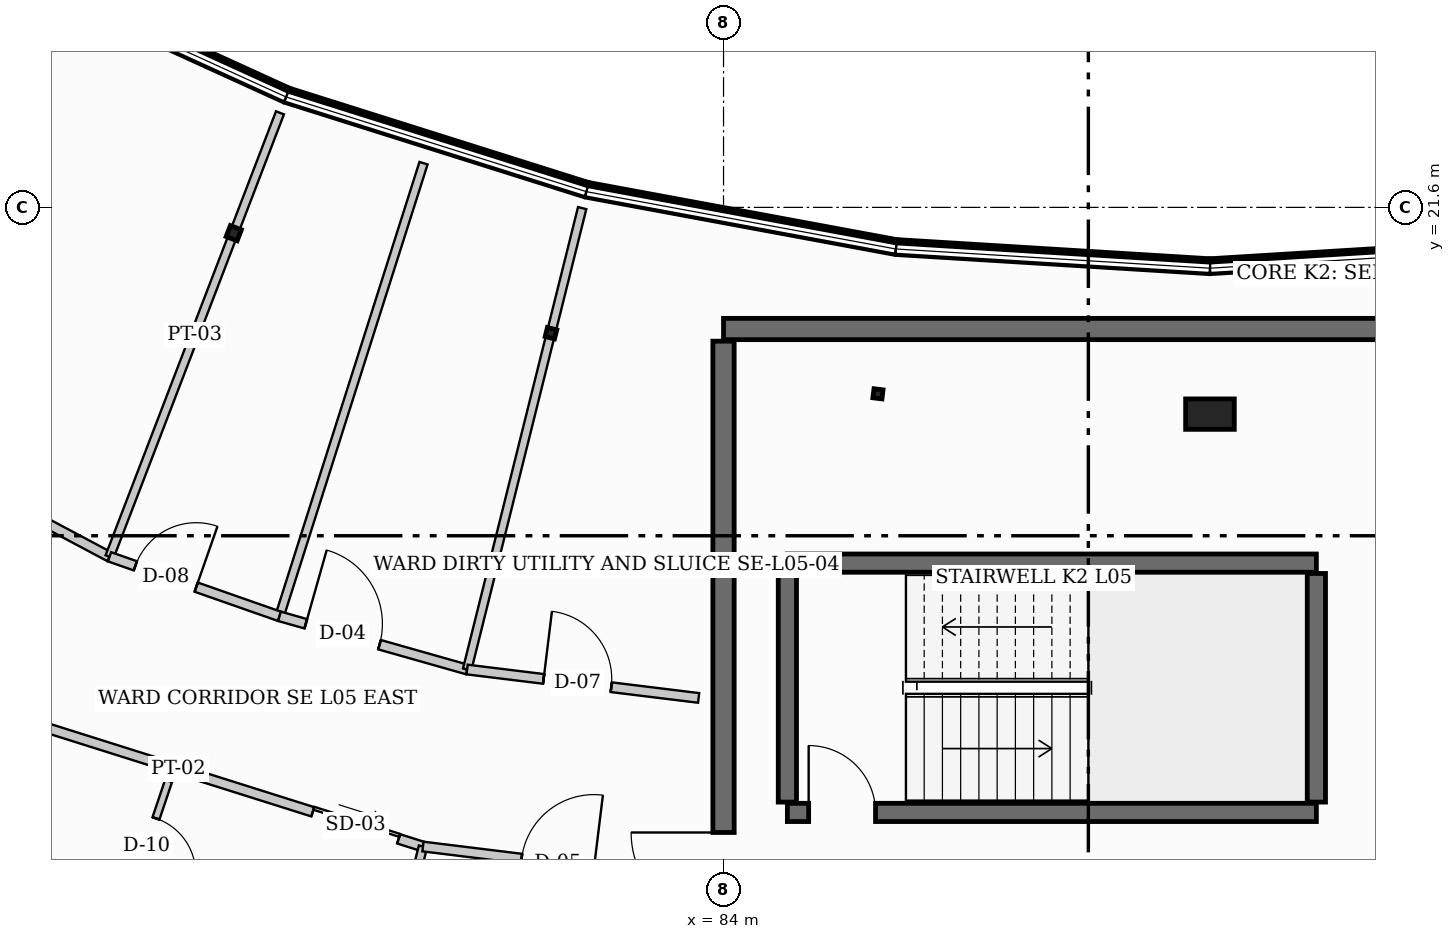
"""IFC4 building model, lengths in metres.
Left out: names, types, materials, properties, quantities, classifications, styles, units other than length and angle.
Written with IfcOpenShell. Run it as: python <this file> out.ifc"""

import sys

from ifc_helpers import new_model, si_unit, direction, frame, frame_2d, origin, origin_2d, place, context, subcontext, project, spatial, rectangle, hollow_rectangle, hollow_circle, i_section, extrude, element, fill, save


model = new_model("IFC4")
c1 = context("Model", 3, precision=1e-05, world=origin(), true_north=direction((0.0, 1.0)))
c2 = subcontext(c1, "Body", "Model", "MODEL_VIEW")
j1 = project(units=[si_unit("LENGTHUNIT", "METRE"), si_unit("PLANEANGLEUNIT", "RADIAN")], contexts=[c1])
p1 = place(None, origin())
s1 = spatial("IfcSite", under=j1, at=p1, CompositionType="ELEMENT")
p2 = place(p1, origin())
s2 = spatial("IfcBuilding", under=s1, at=p2, CompositionType="ELEMENT")
p3 = place(p2, frame((0.0, 0.0, 22.2)))
s3 = spatial("IfcBuildingStorey", under=s2, at=p3, CompositionType="ELEMENT", Elevation=22.2)
p4 = place(p3, frame((75.945, 21.176, 0.0), z_axis=(0.0, 0.0, 1.0), x_axis=(0.358367949545, 0.933580426497, 0.0)))
e1 = element("IfcColumn", 1, at=p4, inside=s3, PredefinedType="COLUMN", context=c2, shape_type="SweptSolid", body=[
    extrude(hollow_circle(Radius=0.097, WallThickness=0.008, at=origin_2d()), origin(), (0.0, 0.0, 1.0), 3.9),
])
p5 = place(p3, frame((81.162, 19.531, 0.0), z_axis=(0.0, 0.0, 1.0), x_axis=(0.2419218956, 0.970295726276, 0.0)))
e2 = element("IfcColumn", 2, at=p5, inside=s3, PredefinedType="COLUMN", context=c2, shape_type="SweptSolid", body=[
    extrude(i_section(OverallWidth=0.153, OverallDepth=0.158, WebThickness=0.007, FlangeThickness=0.01, at=origin_2d()), origin(), (0.0, 0.0, 1.0), 3.9),
])
p6 = place(p3, frame((86.54, 18.534, 0.0), z_axis=(0.0, 0.0, 1.0), x_axis=(0.121869343405, 0.992546151641, 0.0)))
e3 = element("IfcColumn", 3, at=p6, inside=s3, PredefinedType="COLUMN", context=c2, shape_type="SweptSolid", body=[
    extrude(hollow_rectangle(XDim=0.15, YDim=0.15, WallThickness=0.008, at=origin_2d()), origin(), (0.0, 0.0, 1.0), 3.9),
])
p7 = place(p3, frame((92.0, 18.2, 0.0), z_axis=(0.0, 0.0, 1.0), x_axis=(0.0, 1.0, 0.0)))
e4 = element("IfcColumn", 4, at=p7, inside=s3, PredefinedType="PILASTER", context=c2, shape_type="SweptSolid", body=[
    extrude(rectangle(XDim=0.5, YDim=0.8, at=origin_2d()), origin(), (0.0, 0.0, 1.0), 3.9),
])
p8 = place(p3, frame((84.0, 19.6, 0.0), z_axis=(0.0, 0.0, 1.0), x_axis=(1.0, 0.0, 0.0)))
e5 = element("IfcWall", 5, at=p8, inside=s3, PredefinedType="SHEAR", context=c2, shape_type="SweptSolid", body=[
    extrude(rectangle(XDim=20.4, YDim=0.35, at=frame_2d((10.2, 0.0))), origin(), (0.0, 0.0, 1.0), 3.9),
])
p9 = place(p3, frame((84.0, 8.8, 0.0), z_axis=(0.0, 0.0, 1.0), x_axis=(0.0, 1.0, 0.0)))
e6 = element("IfcWall", 6, at=p9, inside=s3, PredefinedType="SHEAR", context=c2, shape_type="SweptSolid", body=[
    extrude(rectangle(XDim=10.6, YDim=0.35, at=frame_2d((5.3, 0.0))), origin(), (0.0, 0.0, 1.0), 3.9),
])
p10 = place(p9, frame((1.0, 0.0, 0.0)))
e7 = element("IfcOpeningElement", 7, at=p10, cuts=e6, PredefinedType="OPENING", context=c2, shape_type="SweptSolid", body=[
    extrude(rectangle(XDim=1.52, YDim=2.16, at=frame_2d((0.76, 1.08))), frame((0.0, 0.185, 0.0), z_axis=(0.0, -1.0, 0.0), x_axis=(1.0, 0.0, 0.0)), (0.0, 0.0, 1.0), 0.37),
])
p11 = place(p3, frame((85.05, 11.65, 0.0), z_axis=(0.0, 0.0, 1.0), x_axis=(1.0, 0.0, 0.0)))
e8 = element("IfcWall", 8, at=p11, inside=s3, PredefinedType="SHEAR", context=c2, shape_type="SweptSolid", body=[
    extrude(rectangle(XDim=8.7, YDim=0.3, at=frame_2d((4.35, 0.0))), origin(), (0.0, 0.0, 1.0), 3.9),
])
p12 = place(p11, frame((0.35, 0.0, 0.0)))
e9 = element("IfcOpeningElement", 9, at=p12, cuts=e8, PredefinedType="OPENING", context=c2, shape_type="SweptSolid", body=[
    extrude(rectangle(XDim=1.1, YDim=2.15, at=frame_2d((0.55, 1.075))), frame((0.0, 0.16, 0.0), z_axis=(0.0, -1.0, 0.0), x_axis=(1.0, 0.0, 0.0)), (0.0, 0.0, 1.0), 0.32),
])
p13 = place(p3, frame((93.75, 15.75, 0.0), z_axis=(0.0, 0.0, 1.0), x_axis=(-1.0, 0.0, 0.0)))
e10 = element("IfcWall", 10, at=p13, inside=s3, PredefinedType="SHEAR", context=c2, shape_type="SweptSolid", body=[
    extrude(rectangle(XDim=8.7, YDim=0.3, at=frame_2d((4.35, 0.0))), origin(), (0.0, 0.0, 1.0), 3.9),
])
for number, where, z_axis, x_axis in (
    (11, (85.05, 11.82, 0.0), (0.0, 0.0, 1.0), (0.0, 1.0, 0.0)),
    (12, (93.75, 11.82, 0.0), (0.0, 0.0, 1.0), (0.0, 1.0, 0.0)),
):
    element("IfcWall", number, at=place(p3, frame(where, z_axis=z_axis, x_axis=x_axis)), inside=s3, PredefinedType="SHEAR", context=c2, shape_type="SweptSolid", body=[
        extrude(rectangle(XDim=3.76, YDim=0.3, at=frame_2d((1.88, 0.0))), origin(), (0.0, 0.0, 1.0), 3.9),
    ])
for number, where, z_axis, x_axis in (
    (13, (92.0, 20.6, 0.0), (0.0, 0.0, 1.0), (0.998, 0.061, 0.0)),
    (14, (86.833, 20.916, 0.0), (0.0, 0.0, 1.0), (0.998, -0.061, 0.0)),
    (15, (81.743, 21.859, 0.0), (0.0, 0.0, 1.0), (0.983, -0.182, 0.0)),
):
    element("IfcWall", number, at=place(p3, frame(where, z_axis=z_axis, x_axis=x_axis)), inside=s3, PredefinedType="STANDARD", context=c2, shape_type="SweptSolid", body=[
        extrude(rectangle(XDim=5.177, YDim=0.22, at=frame_2d((2.588, 0.0))), origin(), (0.0, 0.0, 1.0), 1.05),
    ])
p14 = place(p3, frame((76.805, 23.416, 0.0), z_axis=(0.0, 0.0, 1.0), x_axis=(0.953706582316, -0.300738681994, 0.0)))
e16 = element("IfcWall", 16, at=p14, inside=s3, PredefinedType="STANDARD", context=c2, shape_type="SweptSolid", body=[
    extrude(rectangle(XDim=5.178, YDim=0.22, at=frame_2d((2.589, 0.0))), origin(), (0.0, 0.0, 1.0), 1.05),
])
p15 = place(p3, frame((72.094, 25.563, 0.0), z_axis=(0.0, 0.0, 1.0), x_axis=(0.909955822384, -0.414705198074, 0.0)))
e17 = element("IfcWall", 17, at=p15, inside=s3, PredefinedType="STANDARD", context=c2, shape_type="SweptSolid", body=[
    extrude(rectangle(XDim=5.177, YDim=0.22, at=frame_2d((2.588, 0.0))), origin(), (0.0, 0.0, 1.0), 1.05),
])
p16 = place(p3, frame((71.107, 17.34, 0.0), z_axis=(0.0, 0.0, 1.0), x_axis=(0.882964896182, -0.469439018522, 0.0)))
e18 = element("IfcWall", 18, at=p16, inside=s3, PredefinedType="PARTITIONING", context=c2, shape_type="SweptSolid", body=[
    extrude(rectangle(XDim=3.166, YDim=0.16, at=frame_2d((1.583, 0.0))), origin(), (0.0, 0.0, 1.0), 2.933),
])
p17 = place(p16, frame((0.933, 0.0, 0.0)))
e19 = element("IfcOpeningElement", 19, at=p17, cuts=e18, PredefinedType="OPENING", context=c2, shape_type="SweptSolid", body=[
    extrude(rectangle(XDim=0.92, YDim=2.04, at=frame_2d((0.46, 1.02))), frame((0.0, 0.09, 0.0), z_axis=(0.0, -1.0, 0.0), x_axis=(1.0, 0.0, 0.0)), (0.0, 0.0, 1.0), 0.18),
])
p18 = place(p3, frame((73.902, 15.854, 0.0), z_axis=(0.0, 0.0, 1.0), x_axis=(0.358410014332, 0.933564278251, 0.0)))
e20 = element("IfcWall", 20, at=p18, inside=s3, PredefinedType="PARTITIONING", context=c2, shape_type="SweptSolid", body=[
    extrude(rectangle(XDim=7.821, YDim=0.14, at=frame_2d((3.91, 0.0))), origin(), (0.0, 0.0, 1.0), 2.933),
])
p19 = place(p3, frame((74.873, 12.168, 0.0), z_axis=(0.0, 0.0, 1.0), x_axis=(-0.319199781595, -0.947687448176, 0.0)))
e21 = element("IfcWall", 21, at=p19, inside=s3, PredefinedType="PARTITIONING", context=c2, shape_type="SweptSolid", body=[
    extrude(rectangle(XDim=2.66, YDim=0.12, at=frame_2d((1.33, 0.0))), origin(), (0.0, 0.0, 1.0), 3.189),
])
p20 = place(p19, frame((0.65, 0.0, 0.0)))
e22 = element("IfcOpeningElement", 22, at=p20, cuts=e21, PredefinedType="OPENING", context=c2, shape_type="SweptSolid", body=[
    extrude(rectangle(XDim=0.96, YDim=2.06, at=frame_2d((0.48, 1.03))), frame((0.0, 0.07, 0.0), z_axis=(0.0, -1.0, 0.0), x_axis=(1.0, 0.0, 0.0)), (0.0, 0.0, 1.0), 0.14),
])
p21 = place(p3, frame((72.827, 13.053, 0.0), z_axis=(0.0, 0.0, 1.0), x_axis=(0.953736183483, -0.30064479426, 0.0)))
e23 = element("IfcWall", 23, at=p21, inside=s3, PredefinedType="PARTITIONING", context=c2, shape_type="SweptSolid", body=[
    extrude(rectangle(XDim=6.532, YDim=0.16, at=frame_2d((3.266, 0.0))), origin(), (0.0, 0.0, 1.0), 2.933),
])
p22 = place(p21, frame((4.632, 0.0, 0.0)))
e24 = element("IfcOpeningElement", 24, at=p22, cuts=e23, PredefinedType="OPENING", context=c2, shape_type="SweptSolid", body=[
    extrude(rectangle(XDim=1.48, YDim=2.26, at=frame_2d((0.74, 1.13))), frame((0.0, 0.09, 0.0), z_axis=(0.0, -1.0, 0.0), x_axis=(1.0, 0.0, 0.0)), (0.0, 0.0, 1.0), 0.18),
])
p23 = place(p3, frame((79.057, 11.089, 0.0), z_axis=(0.0, 0.0, 1.0), x_axis=(-0.241911207257, -0.970298391117, 0.0)))
e25 = element("IfcWall", 25, at=p23, inside=s3, PredefinedType="PARTITIONING", context=c2, shape_type="SweptSolid", body=[
    extrude(rectangle(XDim=7.82, YDim=0.14, at=frame_2d((3.91, 0.0))), origin(), (0.0, 0.0, 1.0), 2.938),
])
p24 = place(p3, frame((76.697, 14.875, 0.0), z_axis=(0.0, 0.0, 1.0), x_axis=(0.302952343331, 0.95300570705, 0.0)))
e26 = element("IfcWall", 26, at=p24, inside=s3, PredefinedType="PARTITIONING", context=c2, shape_type="SweptSolid", body=[
    extrude(rectangle(XDim=7.819, YDim=0.14, at=frame_2d((3.91, 0.0))), origin(), (0.0, 0.0, 1.0), 3.241),
])
p25 = place(p3, frame((73.902, 15.854, 0.0), z_axis=(0.0, 0.0, 1.0), x_axis=(0.943776070457, -0.330585433485, 0.0)))
e27 = element("IfcWall", 27, at=p25, inside=s3, PredefinedType="PARTITIONING", context=c2, shape_type="SweptSolid", body=[
    extrude(rectangle(XDim=2.961, YDim=0.16, at=frame_2d((1.481, 0.0))), origin(), (0.0, 0.0, 1.0), 2.933),
])
p26 = place(p25, frame((0.45, 0.0, 0.0)))
e28 = element("IfcOpeningElement", 28, at=p26, cuts=e27, PredefinedType="OPENING", context=c2, shape_type="SweptSolid", body=[
    extrude(rectangle(XDim=1.06, YDim=2.1, at=frame_2d((0.53, 1.05))), frame((0.0, 0.09, 0.0), z_axis=(0.0, -1.0, 0.0), x_axis=(1.0, 0.0, 0.0)), (0.0, 0.0, 1.0), 0.18),
])
p27 = place(p3, frame((76.697, 14.875, 0.0), z_axis=(0.0, 0.0, 1.0), x_axis=(0.962073473599, -0.272790453274, 0.0)))
e29 = element("IfcWall", 29, at=p27, inside=s3, PredefinedType="PARTITIONING", context=c2, shape_type="SweptSolid", body=[
    extrude(rectangle(XDim=3.208, YDim=0.16, at=frame_2d((1.604, 0.0))), origin(), (0.0, 0.0, 1.0), 2.938),
])
p28 = place(p27, frame((0.45, 0.0, 0.0)))
e30 = element("IfcOpeningElement", 30, at=p28, cuts=e29, PredefinedType="OPENING", context=c2, shape_type="SweptSolid", body=[
    extrude(rectangle(XDim=1.26, YDim=2.14, at=frame_2d((0.63, 1.07))), frame((0.0, 0.09, 0.0), z_axis=(0.0, -1.0, 0.0), x_axis=(1.0, 0.0, 0.0)), (0.0, 0.0, 1.0), 0.18),
])
p29 = place(p3, frame((79.783, 14.0, 0.0), z_axis=(0.0, 0.0, 1.0), x_axis=(0.241947927131, 0.970289235515, 0.0)))
e31 = element("IfcWall", 31, at=p29, inside=s3, PredefinedType="PARTITIONING", context=c2, shape_type="SweptSolid", body=[
    extrude(rectangle(XDim=7.82, YDim=0.14, at=frame_2d((3.91, 0.0))), origin(), (0.0, 0.0, 1.0), 2.938),
])
p30 = place(p3, frame((79.057, 11.089, 0.0), z_axis=(0.0, 0.0, 1.0), x_axis=(0.992532332473, -0.121981838793, 0.0)))
e32 = element("IfcWall", 32, at=p30, inside=s3, PredefinedType="PARTITIONING", context=c2, shape_type="SweptSolid", body=[
    extrude(rectangle(XDim=4.567, YDim=0.16, at=frame_2d((2.284, 0.0))), origin(), (0.0, 0.0, 1.0), 2.938),
])
p31 = place(p30, frame((1.634, 0.0, 0.0)))
e33 = element("IfcOpeningElement", 33, at=p31, cuts=e32, PredefinedType="OPENING", context=c2, shape_type="SweptSolid", body=[
    extrude(rectangle(XDim=1.2, YDim=2.12, at=frame_2d((0.6, 1.06))), frame((0.0, 0.09, 0.0), z_axis=(0.0, -1.0, 0.0), x_axis=(1.0, 0.0, 0.0)), (0.0, 0.0, 1.0), 0.18),
])
p32 = place(p3, frame((79.783, 14.0, 0.0), z_axis=(0.0, 0.0, 1.0), x_axis=(0.992559253302, -0.121762591482, 0.0)))
e34 = element("IfcWall", 34, at=p32, inside=s3, PredefinedType="PARTITIONING", context=c2, shape_type="SweptSolid", body=[
    extrude(rectangle(XDim=3.836, YDim=0.16, at=frame_2d((1.918, 0.0))), origin(), (0.0, 0.0, 1.0), 2.938),
])
p33 = place(p32, frame((1.268, 0.0, 0.0)))
e35 = element("IfcOpeningElement", 35, at=p33, cuts=e34, PredefinedType="OPENING", context=c2, shape_type="SweptSolid", body=[
    extrude(rectangle(XDim=1.12, YDim=2.08, at=frame_2d((0.56, 1.04))), frame((0.0, 0.09, 0.0), z_axis=(0.0, -1.0, 0.0), x_axis=(1.0, 0.0, 0.0)), (0.0, 0.0, 1.0), 0.18),
])
p34 = place(p12, origin())
e36 = element("IfcDoor", 36, at=p34, inside=s3, OperationType="SINGLE_SWING_LEFT", PredefinedType="DOOR", context=c2, shape_type="SweptSolid", body=[
    extrude(rectangle(XDim=1.1, YDim=2.15, at=frame_2d((0.55, 1.075))), frame((0.0, 0.025, 0.0), z_axis=(0.0, -1.0, 0.0), x_axis=(1.0, 0.0, 0.0)), (0.0, 0.0, 1.0), 0.05),
])
fill(e9, e36)
p35 = place(p10, origin())
e37 = element("IfcDoor", 37, at=p35, inside=s3, OperationType="SINGLE_SWING_RIGHT", PredefinedType="DOOR", context=c2, shape_type="SweptSolid", body=[
    extrude(rectangle(XDim=1.52, YDim=2.16, at=frame_2d((0.76, 1.08))), frame((0.0, 0.025, 0.0), z_axis=(0.0, -1.0, 0.0), x_axis=(1.0, 0.0, 0.0)), (0.0, 0.0, 1.0), 0.05),
])
fill(e7, e37)
p36 = place(p20, origin())
e38 = element("IfcDoor", 38, at=p36, inside=s3, OperationType="SINGLE_SWING_RIGHT", PredefinedType="DOOR", context=c2, shape_type="SweptSolid", body=[
    extrude(rectangle(XDim=0.96, YDim=2.06, at=frame_2d((0.48, 1.03))), frame((0.0, 0.025, 0.0), z_axis=(0.0, -1.0, 0.0), x_axis=(1.0, 0.0, 0.0)), (0.0, 0.0, 1.0), 0.05),
])
fill(e22, e38)
p37 = place(p22, origin())
e39 = element("IfcDoor", 39, at=p37, inside=s3, OperationType="SLIDING_TO_LEFT", PredefinedType="DOOR", context=c2, shape_type="SweptSolid", body=[
    extrude(rectangle(XDim=1.48, YDim=2.26, at=frame_2d((0.74, 1.13))), frame((0.0, 0.025, 0.0), z_axis=(0.0, -1.0, 0.0), x_axis=(1.0, 0.0, 0.0)), (0.0, 0.0, 1.0), 0.05),
])
fill(e24, e39)
p38 = place(p26, origin())
e40 = element("IfcDoor", 40, at=p38, inside=s3, OperationType="SINGLE_SWING_RIGHT", PredefinedType="DOOR", context=c2, shape_type="SweptSolid", body=[
    extrude(rectangle(XDim=1.06, YDim=2.1, at=frame_2d((0.53, 1.05))), frame((0.0, 0.025, 0.0), z_axis=(0.0, -1.0, 0.0), x_axis=(1.0, 0.0, 0.0)), (0.0, 0.0, 1.0), 0.05),
])
fill(e28, e40)
p39 = place(p28, origin())
e41 = element("IfcDoor", 41, at=p39, inside=s3, OperationType="SINGLE_SWING_LEFT", PredefinedType="DOOR", context=c2, shape_type="SweptSolid", body=[
    extrude(rectangle(XDim=1.26, YDim=2.14, at=frame_2d((0.63, 1.07))), frame((0.0, 0.025, 0.0), z_axis=(0.0, -1.0, 0.0), x_axis=(1.0, 0.0, 0.0)), (0.0, 0.0, 1.0), 0.05),
])
fill(e30, e41)
p40 = place(p31, origin())
e42 = element("IfcDoor", 42, at=p40, inside=s3, OperationType="SINGLE_SWING_RIGHT", PredefinedType="DOOR", context=c2, shape_type="SweptSolid", body=[
    extrude(rectangle(XDim=1.2, YDim=2.12, at=frame_2d((0.6, 1.06))), frame((0.0, 0.025, 0.0), z_axis=(0.0, -1.0, 0.0), x_axis=(1.0, 0.0, 0.0)), (0.0, 0.0, 1.0), 0.05),
])
fill(e33, e42)
p41 = place(p33, origin())
e43 = element("IfcDoor", 43, at=p41, inside=s3, OperationType="SINGLE_SWING_LEFT", PredefinedType="DOOR", context=c2, shape_type="SweptSolid", body=[
    extrude(rectangle(XDim=1.12, YDim=2.08, at=frame_2d((0.56, 1.04))), frame((0.0, 0.025, 0.0), z_axis=(0.0, -1.0, 0.0), x_axis=(1.0, 0.0, 0.0)), (0.0, 0.0, 1.0), 0.05),
])
fill(e35, e43)
save(model, sys.argv[1])
